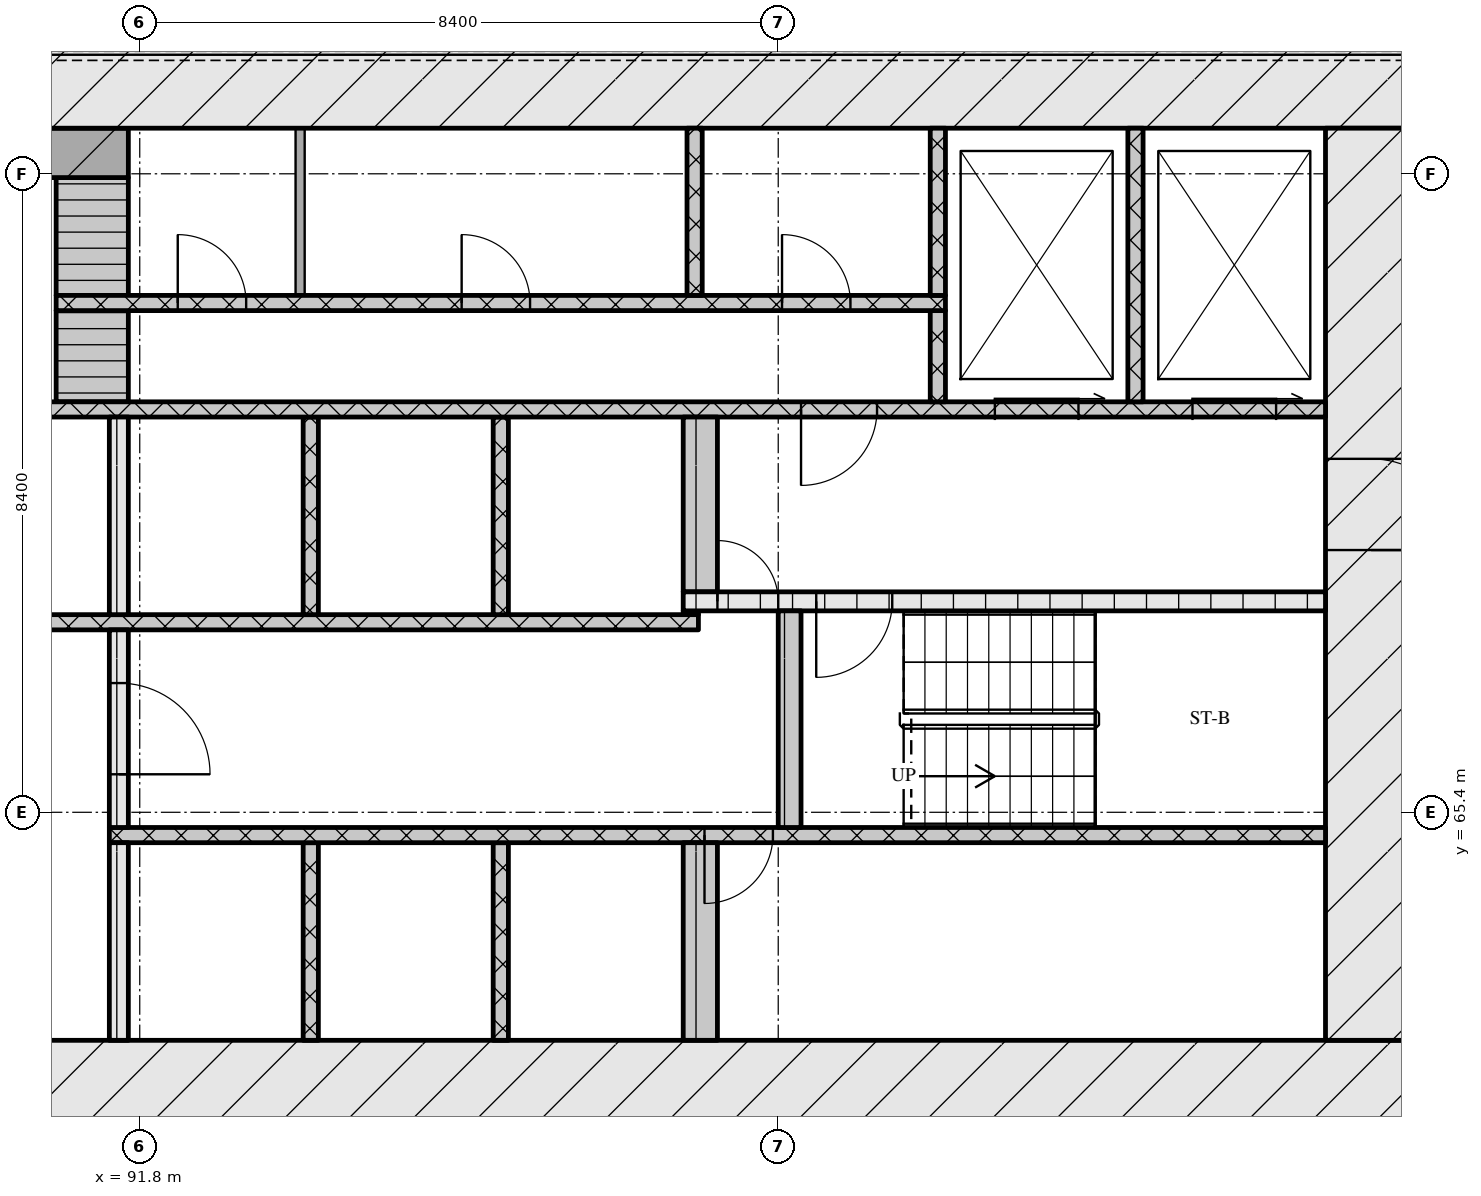
"""IFC4 building model, lengths in metres.
Left out: names, types, materials, properties, quantities, classifications, styles, units other than length and angle.
Written with IfcOpenShell. Run it as: python <this file> out.ifc"""

import sys

from ifc_helpers import new_model, si_unit, direction, frame, frame_2d, origin, place, context, subcontext, project, spatial, rectangle, extrude, element, fill, save


model = new_model("IFC4")
c1 = context("Model", 3, precision=1e-05, world=origin(), true_north=direction((0.0, 1.0)))
c2 = subcontext(c1, "Body", "Model", "MODEL_VIEW")
j1 = project(units=[si_unit("LENGTHUNIT", "METRE"), si_unit("PLANEANGLEUNIT", "RADIAN")], contexts=[c1])
p1 = place(None, origin())
s1 = spatial("IfcSite", under=j1, at=p1, CompositionType="ELEMENT")
p2 = place(p1, origin())
s2 = spatial("IfcBuilding", under=s1, at=p2, CompositionType="ELEMENT")
p3 = place(p2, frame((0.0, 0.0, 51.6)))
s3 = spatial("IfcBuildingStorey", under=s2, at=p3, CompositionType="ELEMENT", Elevation=51.6)
p4 = place(p3, frame((66.6, 61.8, 0.0), z_axis=(0.0, 0.0, 1.0), x_axis=(1.0, 0.0, 0.0)))
e1 = element("IfcWall", 1, at=p4, inside=s3, PredefinedType="SOLIDWALL", context=c2, shape_type="SweptSolid", body=[
    extrude(rectangle(XDim=42.0, YDim=1.2, at=frame_2d((21.0, 0.0))), origin(), (0.0, 0.0, 1.0), 3.32),
])
p5 = place(p4, frame((21.35, 0.0, 0.0)))
e2 = element("IfcOpeningElement", 2, at=p5, cuts=e1, PredefinedType="OPENING", context=c2, shape_type="SweptSolid", body=[
    extrude(rectangle(XDim=1.8, YDim=2.1, at=frame_2d((0.9, 1.05))), frame((0.0, 0.61, 0.0), z_axis=(0.0, -1.0, 0.0), x_axis=(1.0, 0.0, 0.0)), (0.0, 0.0, 1.0), 1.22),
])
p6 = place(p3, frame((66.6, 75.0, 0.0), z_axis=(0.0, 0.0, 1.0), x_axis=(1.0, 0.0, 0.0)))
e3 = element("IfcWall", 3, at=p6, inside=s3, PredefinedType="SOLIDWALL", context=c2, shape_type="SweptSolid", body=[
    extrude(rectangle(XDim=42.0, YDim=1.2, at=frame_2d((21.0, 0.0))), origin(), (0.0, 0.0, 1.0), 3.32),
])
p7 = place(p3, frame((108.0, 62.4, 0.0), z_axis=(0.0, 0.0, 1.0), x_axis=(0.0, 1.0, 0.0)))
e4 = element("IfcWall", 4, at=p7, inside=s3, PredefinedType="SOLIDWALL", context=c2, shape_type="SweptSolid", body=[
    extrude(rectangle(XDim=12.0, YDim=1.2, at=frame_2d((6.0, 0.0))), origin(), (0.0, 0.0, 1.0), 3.32),
])
p8 = place(p7, frame((6.45, 0.0, 0.0)))
e5 = element("IfcOpeningElement", 5, at=p8, cuts=e4, PredefinedType="OPENING", context=c2, shape_type="SweptSolid", body=[
    extrude(rectangle(XDim=1.2, YDim=2.1, at=frame_2d((0.6, 1.05))), frame((0.0, 0.61, 0.0), z_axis=(0.0, -1.0, 0.0), x_axis=(1.0, 0.0, 0.0)), (0.0, 0.0, 1.0), 1.22),
])
p9 = place(p3, frame((91.525, 62.4, 0.0), z_axis=(0.0, 0.0, 1.0), x_axis=(0.0, 1.0, 0.0)))
e6 = element("IfcWall", 6, at=p9, inside=s3, PredefinedType="SOLIDWALL", context=c2, shape_type="SweptSolid", body=[
    extrude(rectangle(XDim=2.6, YDim=0.25, at=frame_2d((1.3, 0.0))), origin(), (0.0, 0.0, 1.0), 3.32),
])
for number, where, z_axis, x_axis in (
    (7, (94.05, 62.4, 0.0), (0.0, 0.0, 1.0), (0.0, 1.0, 0.0)),
    (8, (96.55, 62.4, 0.0), (0.0, 0.0, 1.0), (0.0, 1.0, 0.0)),
):
    element("IfcWall", number, at=place(p3, frame(where, z_axis=z_axis, x_axis=x_axis)), inside=s3, PredefinedType="SOLIDWALL", context=c2, shape_type="SweptSolid", body=[
        extrude(rectangle(XDim=2.6, YDim=0.2, at=frame_2d((1.3, 0.0))), origin(), (0.0, 0.0, 1.0), 3.32),
    ])
p10 = place(p3, frame((99.175, 62.4, 0.0), z_axis=(0.0, 0.0, 1.0), x_axis=(0.0, 1.0, 0.0)))
e9 = element("IfcWall", 9, at=p10, inside=s3, PredefinedType="SOLIDWALL", context=c2, shape_type="SweptSolid", body=[
    extrude(rectangle(XDim=2.6, YDim=0.45, at=frame_2d((1.3, 0.0))), origin(), (0.0, 0.0, 1.0), 3.32),
])
p11 = place(p3, frame((91.4, 65.1, 0.0), z_axis=(0.0, 0.0, 1.0), x_axis=(1.0, 0.0, 0.0)))
e10 = element("IfcWall", 10, at=p11, inside=s3, PredefinedType="SOLIDWALL", context=c2, shape_type="SweptSolid", body=[
    extrude(rectangle(XDim=16.0, YDim=0.2, at=frame_2d((8.0, 0.0))), origin(), (0.0, 0.0, 1.0), 3.32),
])
p12 = place(p11, frame((7.83, 0.0, 0.0)))
e11 = element("IfcOpeningElement", 11, at=p12, cuts=e10, PredefinedType="OPENING", context=c2, shape_type="SweptSolid", body=[
    extrude(rectangle(XDim=0.9, YDim=2.1, at=frame_2d((0.45, 1.05))), frame((0.0, 0.11, 0.0), z_axis=(0.0, -1.0, 0.0), x_axis=(1.0, 0.0, 0.0)), (0.0, 0.0, 1.0), 0.22),
])
p13 = place(p3, frame((91.525, 65.2, 0.0), z_axis=(0.0, 0.0, 1.0), x_axis=(0.0, 1.0, 0.0)))
e12 = element("IfcWall", 12, at=p13, inside=s3, PredefinedType="SOLIDWALL", context=c2, shape_type="SweptSolid", body=[
    extrude(rectangle(XDim=2.6, YDim=0.25, at=frame_2d((1.3, 0.0))), origin(), (0.0, 0.0, 1.0), 3.32),
])
p14 = place(p13, frame((0.7, 0.0, 0.0)))
e13 = element("IfcOpeningElement", 13, at=p14, cuts=e12, PredefinedType="OPENING", context=c2, shape_type="SweptSolid", body=[
    extrude(rectangle(XDim=1.2, YDim=2.1, at=frame_2d((0.6, 1.05))), frame((0.0, 0.135, 0.0), z_axis=(0.0, -1.0, 0.0), x_axis=(1.0, 0.0, 0.0)), (0.0, 0.0, 1.0), 0.27),
])
p15 = place(p3, frame((100.35, 65.2, 0.0), z_axis=(0.0, 0.0, 1.0), x_axis=(0.0, 1.0, 0.0)))
e14 = element("IfcWall", 14, at=p15, inside=s3, PredefinedType="SOLIDWALL", context=c2, shape_type="SweptSolid", body=[
    extrude(rectangle(XDim=2.85, YDim=0.3, at=frame_2d((1.425, 0.0))), origin(), (0.0, 0.0, 1.0), 3.32),
])
p16 = place(p3, frame((76.05, 67.9, 0.0), z_axis=(0.0, 0.0, 1.0), x_axis=(1.0, 0.0, 0.0)))
e15 = element("IfcWall", 15, at=p16, inside=s3, PredefinedType="SOLIDWALL", context=c2, shape_type="SweptSolid", body=[
    extrude(rectangle(XDim=23.1, YDim=0.2, at=frame_2d((11.55, 0.0))), origin(), (0.0, 0.0, 1.0), 3.32),
])
p17 = place(p16, frame((0.6, 0.0, 0.0)))
e16 = element("IfcOpeningElement", 16, at=p17, cuts=e15, PredefinedType="OPENING", context=c2, shape_type="SweptSolid", body=[
    extrude(rectangle(XDim=1.1, YDim=2.1, at=frame_2d((0.55, 1.05))), frame((0.0, 0.11, 0.0), z_axis=(0.0, -1.0, 0.0), x_axis=(1.0, 0.0, 0.0)), (0.0, 0.0, 1.0), 0.22),
])
p18 = place(p16, frame((3.1, 0.0, 0.0)))
e17 = element("IfcOpeningElement", 17, at=p18, cuts=e15, PredefinedType="OPENING", context=c2, shape_type="SweptSolid", body=[
    extrude(rectangle(XDim=1.1, YDim=2.1, at=frame_2d((0.55, 1.05))), frame((0.0, 0.11, 0.0), z_axis=(0.0, -1.0, 0.0), x_axis=(1.0, 0.0, 0.0)), (0.0, 0.0, 1.0), 0.22),
])
p19 = place(p16, frame((5.6, 0.0, 0.0)))
e18 = element("IfcOpeningElement", 18, at=p19, cuts=e15, PredefinedType="OPENING", context=c2, shape_type="SweptSolid", body=[
    extrude(rectangle(XDim=1.1, YDim=2.1, at=frame_2d((0.55, 1.05))), frame((0.0, 0.11, 0.0), z_axis=(0.0, -1.0, 0.0), x_axis=(1.0, 0.0, 0.0)), (0.0, 0.0, 1.0), 0.22),
])
p20 = place(p16, frame((9.7, 0.0, 0.0)))
e19 = element("IfcOpeningElement", 19, at=p20, cuts=e15, PredefinedType="OPENING", context=c2, shape_type="SweptSolid", body=[
    extrude(rectangle(XDim=0.9, YDim=2.1, at=frame_2d((0.45, 1.05))), frame((0.0, 0.11, 0.0), z_axis=(0.0, -1.0, 0.0), x_axis=(1.0, 0.0, 0.0)), (0.0, 0.0, 1.0), 0.22),
])
p21 = place(p16, frame((13.55, 0.0, 0.0)))
e20 = element("IfcOpeningElement", 20, at=p21, cuts=e15, PredefinedType="OPENING", context=c2, shape_type="SweptSolid", body=[
    extrude(rectangle(XDim=1.0, YDim=2.1, at=frame_2d((0.5, 1.05))), frame((0.0, 0.11, 0.0), z_axis=(0.0, -1.0, 0.0), x_axis=(1.0, 0.0, 0.0)), (0.0, 0.0, 1.0), 0.22),
])
p22 = place(p3, frame((91.525, 68.0, 0.0), z_axis=(0.0, 0.0, 1.0), x_axis=(0.0, 1.0, 0.0)))
e21 = element("IfcWall", 21, at=p22, inside=s3, PredefinedType="SOLIDWALL", context=c2, shape_type="SweptSolid", body=[
    extrude(rectangle(XDim=2.6, YDim=0.25, at=frame_2d((1.3, 0.0))), origin(), (0.0, 0.0, 1.0), 3.32),
])
for number, where, z_axis, x_axis in (
    (22, (94.05, 68.0, 0.0), (0.0, 0.0, 1.0), (0.0, 1.0, 0.0)),
    (23, (96.55, 68.0, 0.0), (0.0, 0.0, 1.0), (0.0, 1.0, 0.0)),
):
    element("IfcWall", number, at=place(p3, frame(where, z_axis=z_axis, x_axis=x_axis)), inside=s3, PredefinedType="SOLIDWALL", context=c2, shape_type="SweptSolid", body=[
        extrude(rectangle(XDim=2.6, YDim=0.2, at=frame_2d((1.3, 0.0))), origin(), (0.0, 0.0, 1.0), 3.32),
    ])
p23 = place(p3, frame((98.95, 68.025, 0.0), z_axis=(0.0, 0.0, 1.0), x_axis=(1.0, 0.0, 0.0)))
e24 = element("IfcWall", 24, at=p23, inside=s3, PredefinedType="SOLIDWALL", context=c2, shape_type="SweptSolid", body=[
    extrude(rectangle(XDim=0.2, YDim=0.05, at=frame_2d((0.1, 0.0))), origin(), (0.0, 0.0, 1.0), 3.32),
])
p24 = place(p3, frame((98.95, 68.175, 0.0), z_axis=(0.0, 0.0, 1.0), x_axis=(1.0, 0.0, 0.0)))
e25 = element("IfcWall", 25, at=p24, inside=s3, PredefinedType="SOLIDWALL", context=c2, shape_type="SweptSolid", body=[
    extrude(rectangle(XDim=8.45, YDim=0.25, at=frame_2d((4.225, 0.0))), origin(), (0.0, 0.0, 1.0), 3.32),
])
p25 = place(p24, frame((0.45, 0.0, 0.0)))
e26 = element("IfcOpeningElement", 26, at=p25, cuts=e25, PredefinedType="OPENING", context=c2, shape_type="SweptSolid", body=[
    extrude(rectangle(XDim=0.8, YDim=2.1, at=frame_2d((0.4, 1.05))), frame((0.0, 0.135, 0.0), z_axis=(0.0, -1.0, 0.0), x_axis=(1.0, 0.0, 0.0)), (0.0, 0.0, 1.0), 0.27),
])
p26 = place(p24, frame((1.75, 0.0, 0.0)))
e27 = element("IfcOpeningElement", 27, at=p26, cuts=e25, PredefinedType="OPENING", context=c2, shape_type="SweptSolid", body=[
    extrude(rectangle(XDim=1.0, YDim=2.1, at=frame_2d((0.5, 1.05))), frame((0.0, 0.135, 0.0), z_axis=(0.0, -1.0, 0.0), x_axis=(1.0, 0.0, 0.0)), (0.0, 0.0, 1.0), 0.27),
])
p27 = place(p3, frame((99.175, 68.3, 0.0), z_axis=(0.0, 0.0, 1.0), x_axis=(0.0, 1.0, 0.0)))
e28 = element("IfcWall", 28, at=p27, inside=s3, PredefinedType="SOLIDWALL", context=c2, shape_type="SweptSolid", body=[
    extrude(rectangle(XDim=2.3, YDim=0.45, at=frame_2d((1.15, 0.0))), origin(), (0.0, 0.0, 1.0), 3.32),
])
p28 = place(p3, frame((67.8, 70.7, 0.0), z_axis=(0.0, 0.0, 1.0), x_axis=(1.0, 0.0, 0.0)))
e29 = element("IfcWall", 29, at=p28, inside=s3, PredefinedType="SOLIDWALL", context=c2, shape_type="SweptSolid", body=[
    extrude(rectangle(XDim=39.6, YDim=0.2, at=frame_2d((19.8, 0.0))), origin(), (0.0, 0.0, 1.0), 3.32),
])
p29 = place(p28, frame((0.65, 0.0, 0.0)))
e30 = element("IfcOpeningElement", 30, at=p29, cuts=e29, PredefinedType="OPENING", context=c2, shape_type="SweptSolid", body=[
    extrude(rectangle(XDim=1.1, YDim=2.1, at=frame_2d((0.55, 1.05))), frame((0.0, 0.11, 0.0), z_axis=(0.0, -1.0, 0.0), x_axis=(1.0, 0.0, 0.0)), (0.0, 0.0, 1.0), 0.22),
])
p30 = place(p28, frame((3.25, 0.0, 0.0)))
e31 = element("IfcOpeningElement", 31, at=p30, cuts=e29, PredefinedType="OPENING", context=c2, shape_type="SweptSolid", body=[
    extrude(rectangle(XDim=1.1, YDim=2.1, at=frame_2d((0.55, 1.05))), frame((0.0, 0.11, 0.0), z_axis=(0.0, -1.0, 0.0), x_axis=(1.0, 0.0, 0.0)), (0.0, 0.0, 1.0), 0.22),
])
p31 = place(p28, frame((5.9, 0.0, 0.0)))
e32 = element("IfcOpeningElement", 32, at=p31, cuts=e29, PredefinedType="OPENING", context=c2, shape_type="SweptSolid", body=[
    extrude(rectangle(XDim=1.0, YDim=2.1, at=frame_2d((0.5, 1.05))), frame((0.0, 0.11, 0.0), z_axis=(0.0, -1.0, 0.0), x_axis=(1.0, 0.0, 0.0)), (0.0, 0.0, 1.0), 0.22),
])
p32 = place(p28, frame((21.7, 0.0, 0.0)))
e33 = element("IfcOpeningElement", 33, at=p32, cuts=e29, PredefinedType="OPENING", context=c2, shape_type="SweptSolid", body=[
    extrude(rectangle(XDim=1.0, YDim=2.1, at=frame_2d((0.5, 1.05))), frame((0.0, 0.11, 0.0), z_axis=(0.0, -1.0, 0.0), x_axis=(1.0, 0.0, 0.0)), (0.0, 0.0, 1.0), 0.22),
])
p33 = place(p28, frame((32.7, 0.0, 0.0)))
e34 = element("IfcOpeningElement", 34, at=p33, cuts=e29, PredefinedType="OPENING", context=c2, shape_type="SweptSolid", body=[
    extrude(rectangle(XDim=1.0, YDim=2.1, at=frame_2d((0.5, 1.05))), frame((0.0, 0.11, 0.0), z_axis=(0.0, -1.0, 0.0), x_axis=(1.0, 0.0, 0.0)), (0.0, 0.0, 1.0), 0.22),
])
p34 = place(p28, frame((35.25, 0.0, 0.0)))
e35 = element("IfcOpeningElement", 35, at=p34, cuts=e29, PredefinedType="OPENING", context=c2, shape_type="SweptSolid", body=[
    extrude(rectangle(XDim=1.1, YDim=2.1, at=frame_2d((0.55, 1.05))), frame((0.0, 0.11, 0.0), z_axis=(0.0, -1.0, 0.0), x_axis=(1.0, 0.0, 0.0)), (0.0, 0.0, 1.0), 0.22),
])
p35 = place(p28, frame((37.85, 0.0, 0.0)))
e36 = element("IfcOpeningElement", 36, at=p35, cuts=e29, PredefinedType="OPENING", context=c2, shape_type="SweptSolid", body=[
    extrude(rectangle(XDim=1.1, YDim=2.1, at=frame_2d((0.55, 1.05))), frame((0.0, 0.11, 0.0), z_axis=(0.0, -1.0, 0.0), x_axis=(1.0, 0.0, 0.0)), (0.0, 0.0, 1.0), 0.22),
])
p36 = place(p3, frame((91.175, 70.8, 0.0), z_axis=(0.0, 0.0, 1.0), x_axis=(0.0, 1.0, 0.0)))
e37 = element("IfcWall", 37, at=p36, inside=s3, PredefinedType="SOLIDWALL", context=c2, shape_type="SweptSolid", body=[
    extrude(rectangle(XDim=1.2, YDim=0.95, at=frame_2d((0.6, 0.0))), origin(), (0.0, 0.0, 1.0), 3.32),
])
p37 = place(p3, frame((102.3, 70.8, 0.0), z_axis=(0.0, 0.0, 1.0), x_axis=(0.0, 1.0, 0.0)))
e38 = element("IfcWall", 38, at=p37, inside=s3, PredefinedType="SOLIDWALL", context=c2, shape_type="SweptSolid", body=[
    extrude(rectangle(XDim=1.2, YDim=0.2, at=frame_2d((0.6, 0.0))), origin(), (0.0, 0.0, 1.0), 3.32),
])
p38 = place(p3, frame((104.9, 70.8, 0.0), z_axis=(0.0, 0.0, 1.0), x_axis=(0.0, 1.0, 0.0)))
e39 = element("IfcWall", 39, at=p38, inside=s3, PredefinedType="SOLIDWALL", context=c2, shape_type="SweptSolid", body=[
    extrude(rectangle(XDim=3.6, YDim=0.2, at=frame_2d((1.8, 0.0))), origin(), (0.0, 0.0, 1.0), 3.32),
])
p39 = place(p3, frame((90.7, 72.1, 0.0), z_axis=(0.0, 0.0, 1.0), x_axis=(1.0, 0.0, 0.0)))
e40 = element("IfcWall", 40, at=p39, inside=s3, PredefinedType="SOLIDWALL", context=c2, shape_type="SweptSolid", body=[
    extrude(rectangle(XDim=11.7, YDim=0.2, at=frame_2d((5.85, 0.0))), origin(), (0.0, 0.0, 1.0), 3.32),
])
p40 = place(p39, frame((1.6, 0.0, 0.0)))
e41 = element("IfcOpeningElement", 41, at=p40, cuts=e40, PredefinedType="OPENING", context=c2, shape_type="SweptSolid", body=[
    extrude(rectangle(XDim=0.9, YDim=2.1, at=frame_2d((0.45, 1.05))), frame((0.0, 0.11, 0.0), z_axis=(0.0, -1.0, 0.0), x_axis=(1.0, 0.0, 0.0)), (0.0, 0.0, 1.0), 0.22),
])
p41 = place(p39, frame((5.335, 0.0, 0.0)))
e42 = element("IfcOpeningElement", 42, at=p41, cuts=e40, PredefinedType="OPENING", context=c2, shape_type="SweptSolid", body=[
    extrude(rectangle(XDim=0.9, YDim=2.1, at=frame_2d((0.45, 1.05))), frame((0.0, 0.11, 0.0), z_axis=(0.0, -1.0, 0.0), x_axis=(1.0, 0.0, 0.0)), (0.0, 0.0, 1.0), 0.22),
])
p42 = place(p39, frame((9.55, 0.0, 0.0)))
e43 = element("IfcOpeningElement", 43, at=p42, cuts=e40, PredefinedType="OPENING", context=c2, shape_type="SweptSolid", body=[
    extrude(rectangle(XDim=0.9, YDim=2.1, at=frame_2d((0.45, 1.05))), frame((0.0, 0.11, 0.0), z_axis=(0.0, -1.0, 0.0), x_axis=(1.0, 0.0, 0.0)), (0.0, 0.0, 1.0), 0.22),
])
p43 = place(p3, frame((91.175, 72.2, 0.0), z_axis=(0.0, 0.0, 1.0), x_axis=(0.0, 1.0, 0.0)))
e44 = element("IfcWall", 44, at=p43, inside=s3, PredefinedType="SOLIDWALL", context=c2, shape_type="SweptSolid", body=[
    extrude(rectangle(XDim=1.55, YDim=0.95, at=frame_2d((0.775, 0.0))), origin(), (0.0, 0.0, 1.0), 3.32),
])
p44 = place(p3, frame((93.91, 72.2, 0.0), z_axis=(0.0, 0.0, 1.0), x_axis=(0.0, 1.0, 0.0)))
e45 = element("IfcWall", 45, at=p44, inside=s3, PredefinedType="PARTITIONING", context=c2, shape_type="SweptSolid", body=[
    extrude(rectangle(XDim=2.2, YDim=0.12, at=frame_2d((1.1, 0.0))), origin(), (0.0, 0.0, 1.0), 3.32),
])
for number, where, z_axis, x_axis in (
    (46, (99.1, 72.2, 0.0), (0.0, 0.0, 1.0), (0.0, 1.0, 0.0)),
    (47, (102.3, 72.2, 0.0), (0.0, 0.0, 1.0), (0.0, 1.0, 0.0)),
):
    element("IfcWall", number, at=place(p3, frame(where, z_axis=z_axis, x_axis=x_axis)), inside=s3, PredefinedType="SOLIDWALL", context=c2, shape_type="SweptSolid", body=[
        extrude(rectangle(XDim=2.2, YDim=0.2, at=frame_2d((1.1, 0.0))), origin(), (0.0, 0.0, 1.0), 3.32),
    ])
p45 = place(p3, frame((83.55, 74.075, 0.0), z_axis=(0.0, 0.0, 1.0), x_axis=(1.0, 0.0, 0.0)))
e48 = element("IfcWall", 48, at=p45, inside=s3, PredefinedType="SOLIDWALL", context=c2, shape_type="SweptSolid", body=[
    extrude(rectangle(XDim=8.1, YDim=0.65, at=frame_2d((4.05, 0.0))), origin(), (0.0, 0.0, 1.0), 3.32),
])
p46 = place(p12, origin())
e49 = element("IfcDoor", 49, at=p46, inside=s3, OperationType="SINGLE_SWING_RIGHT", PredefinedType="DOOR", context=c2, shape_type="SweptSolid", body=[
    extrude(rectangle(XDim=0.9, YDim=2.1, at=frame_2d((0.45, 1.05))), frame((0.0, 0.025, 0.0), z_axis=(0.0, -1.0, 0.0), x_axis=(1.0, 0.0, 0.0)), (0.0, 0.0, 1.0), 0.05),
])
fill(e11, e49)
p47 = place(p14, origin())
e50 = element("IfcDoor", 50, at=p47, inside=s3, OperationType="SINGLE_SWING_RIGHT", PredefinedType="DOOR", context=c2, shape_type="SweptSolid", body=[
    extrude(rectangle(XDim=1.2, YDim=2.1, at=frame_2d((0.6, 1.05))), frame((0.0, 0.025, 0.0), z_axis=(0.0, -1.0, 0.0), x_axis=(1.0, 0.0, 0.0)), (0.0, 0.0, 1.0), 0.05),
])
fill(e13, e50)
p48 = place(p25, origin())
e51 = element("IfcDoor", 51, at=p48, inside=s3, OperationType="SINGLE_SWING_LEFT", PredefinedType="DOOR", context=c2, shape_type="SweptSolid", body=[
    extrude(rectangle(XDim=0.8, YDim=2.1, at=frame_2d((0.4, 1.05))), frame((0.0, 0.025, 0.0), z_axis=(0.0, -1.0, 0.0), x_axis=(1.0, 0.0, 0.0)), (0.0, 0.0, 1.0), 0.05),
])
fill(e26, e51)
p49 = place(p26, origin())
e52 = element("IfcDoor", 52, at=p49, inside=s3, OperationType="SINGLE_SWING_RIGHT", PredefinedType="DOOR", context=c2, shape_type="SweptSolid", body=[
    extrude(rectangle(XDim=1.0, YDim=2.1, at=frame_2d((0.5, 1.05))), frame((0.0, 0.025, 0.0), z_axis=(0.0, -1.0, 0.0), x_axis=(1.0, 0.0, 0.0)), (0.0, 0.0, 1.0), 0.05),
])
fill(e27, e52)
p50 = place(p8, origin())
e53 = element("IfcDoor", 53, at=p50, inside=s3, OperationType="SINGLE_SWING_RIGHT", PredefinedType="DOOR", context=c2, shape_type="SweptSolid", body=[
    extrude(rectangle(XDim=1.2, YDim=2.1, at=frame_2d((0.6, 1.05))), frame((0.0, 0.025, 0.0), z_axis=(0.0, -1.0, 0.0), x_axis=(1.0, 0.0, 0.0)), (0.0, 0.0, 1.0), 0.05),
])
fill(e5, e53)
p51 = place(p33, origin())
e54 = element("IfcDoor", 54, at=p51, inside=s3, OperationType="SINGLE_SWING_RIGHT", PredefinedType="DOOR", context=c2, shape_type="SweptSolid", body=[
    extrude(rectangle(XDim=1.0, YDim=2.1, at=frame_2d((0.5, 1.05))), frame((0.0, 0.025, 0.0), z_axis=(0.0, -1.0, 0.0), x_axis=(1.0, 0.0, 0.0)), (0.0, 0.0, 1.0), 0.05),
])
fill(e34, e54)
p52 = place(p34, origin())
e55 = element("IfcDoor", 55, at=p52, inside=s3, OperationType="SLIDING_TO_RIGHT", PredefinedType="DOOR", context=c2, shape_type="SweptSolid", body=[
    extrude(rectangle(XDim=1.1, YDim=2.1, at=frame_2d((0.55, 1.05))), frame((0.0, 0.025, 0.0), z_axis=(0.0, -1.0, 0.0), x_axis=(1.0, 0.0, 0.0)), (0.0, 0.0, 1.0), 0.05),
])
fill(e35, e55)
p53 = place(p35, origin())
e56 = element("IfcDoor", 56, at=p53, inside=s3, OperationType="SLIDING_TO_RIGHT", PredefinedType="DOOR", context=c2, shape_type="SweptSolid", body=[
    extrude(rectangle(XDim=1.1, YDim=2.1, at=frame_2d((0.55, 1.05))), frame((0.0, 0.025, 0.0), z_axis=(0.0, -1.0, 0.0), x_axis=(1.0, 0.0, 0.0)), (0.0, 0.0, 1.0), 0.05),
])
fill(e36, e56)
p54 = place(p40, origin())
e57 = element("IfcDoor", 57, at=p54, inside=s3, OperationType="SINGLE_SWING_LEFT", PredefinedType="DOOR", context=c2, shape_type="SweptSolid", body=[
    extrude(rectangle(XDim=0.9, YDim=2.1, at=frame_2d((0.45, 1.05))), frame((0.0, 0.025, 0.0), z_axis=(0.0, -1.0, 0.0), x_axis=(1.0, 0.0, 0.0)), (0.0, 0.0, 1.0), 0.05),
])
fill(e41, e57)
p55 = place(p41, origin())
e58 = element("IfcDoor", 58, at=p55, inside=s3, OperationType="SINGLE_SWING_LEFT", PredefinedType="DOOR", context=c2, shape_type="SweptSolid", body=[
    extrude(rectangle(XDim=0.9, YDim=2.1, at=frame_2d((0.45, 1.05))), frame((0.0, 0.025, 0.0), z_axis=(0.0, -1.0, 0.0), x_axis=(1.0, 0.0, 0.0)), (0.0, 0.0, 1.0), 0.05),
])
fill(e42, e58)
p56 = place(p42, origin())
e59 = element("IfcDoor", 59, at=p56, inside=s3, OperationType="SINGLE_SWING_LEFT", PredefinedType="DOOR", context=c2, shape_type="SweptSolid", body=[
    extrude(rectangle(XDim=0.9, YDim=2.1, at=frame_2d((0.45, 1.05))), frame((0.0, 0.025, 0.0), z_axis=(0.0, -1.0, 0.0), x_axis=(1.0, 0.0, 0.0)), (0.0, 0.0, 1.0), 0.05),
])
fill(e43, e59)
save(model, sys.argv[1])
